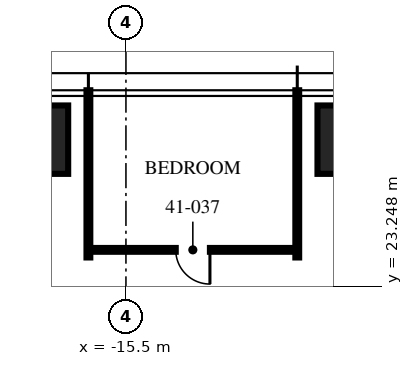
"""IFC4 building model, lengths in metres.
Left out: names, types, materials, properties, quantities, classifications, styles, units other than length and angle.
Written with IfcOpenShell. Run it as: python <this file> out.ifc"""

import sys

from ifc_helpers import new_model, si_unit, direction, frame, frame_2d, origin, origin_2d, place, context, subcontext, project, spatial, rectangle, extrude, element, fill, save


model = new_model("IFC4")
c1 = context("Model", 3, precision=1e-05, world=origin(), true_north=direction((0.0, 1.0)))
c2 = subcontext(c1, "Body", "Model", "MODEL_VIEW")
j1 = project(units=[si_unit("LENGTHUNIT", "METRE"), si_unit("PLANEANGLEUNIT", "RADIAN")], contexts=[c1])
p1 = place(None, origin())
s1 = spatial("IfcSite", under=j1, at=p1, CompositionType="ELEMENT")
p2 = place(p1, origin())
s2 = spatial("IfcBuilding", under=s1, at=p2, CompositionType="ELEMENT")
p3 = place(p2, frame((0.0, 0.0, 163.5)))
s3 = spatial("IfcBuildingStorey", under=s2, at=p3, CompositionType="ELEMENT", Elevation=163.5)
for number, where, z_axis, x_axis in (
    (1, (-18.32, 27.1, 0.0), (0.0, 0.0, 1.0), (1.0, 0.0, 0.0)),
    (2, (-9.16, 27.1, 0.0), (0.0, 0.0, 1.0), (1.0, 0.0, 0.0)),
):
    element("IfcColumn", number, at=place(p3, frame(where, z_axis=z_axis, x_axis=x_axis)), inside=s3, PredefinedType="COLUMN", context=c2, shape_type="SweptSolid", body=[
        extrude(rectangle(XDim=2.6, YDim=1.8, at=origin_2d()), origin(), (0.0, 0.0, 1.0), 3.75),
    ])
for number, where, z_axis, x_axis in (
    (3, (-10.992, 24.0, 0.0), (0.0, 0.0, 1.0), (0.0, 1.0, 0.0)),
    (4, (-16.488, 24.0, 0.0), (0.0, 0.0, 1.0), (0.0, 1.0, 0.0)),
):
    element("IfcWall", number, at=place(p3, frame(where, z_axis=z_axis, x_axis=x_axis)), inside=s3, PredefinedType="PARTITIONING", context=c2, shape_type="SweptSolid", body=[
        extrude(rectangle(XDim=4.4, YDim=0.1, at=frame_2d((2.2, 0.0))), origin(), (0.0, 0.0, 1.0), 2.81),
    ])
p4 = place(p3, frame((-10.992, 24.2, 0.0), z_axis=(0.0, 0.0, 1.0), x_axis=(-1.0, 0.0, 0.0)))
e5 = element("IfcWall", 5, at=p4, inside=s3, PredefinedType="PARTITIONING", context=c2, shape_type="SweptSolid", body=[
    extrude(rectangle(XDim=5.496, YDim=0.1, at=frame_2d((2.748, 0.0))), origin(), (0.0, 0.0, 1.0), 2.81),
])
p5 = place(p4, frame((2.298, 0.0, 0.0)))
e6 = element("IfcOpeningElement", 6, at=p5, cuts=e5, PredefinedType="OPENING", context=c2, shape_type="SweptSolid", body=[
    extrude(rectangle(XDim=0.9, YDim=2.1, at=frame_2d((0.45, 1.05))), frame((0.0, 0.06, 0.0), z_axis=(0.0, -1.0, 0.0), x_axis=(1.0, 0.0, 0.0)), (0.0, 0.0, 1.0), 0.12),
])
p6 = place(p5, origin())
e7 = element("IfcDoor", 7, at=p6, inside=s3, OperationType="SINGLE_SWING_LEFT", PredefinedType="DOOR", context=c2, shape_type="SweptSolid", body=[
    extrude(rectangle(XDim=0.9, YDim=2.1, at=frame_2d((0.45, 1.05))), frame((0.0, 0.025, 0.0), z_axis=(0.0, -1.0, 0.0), x_axis=(1.0, 0.0, 0.0)), (0.0, 0.0, 1.0), 0.05),
])
fill(e6, e7)
save(model, sys.argv[1])
